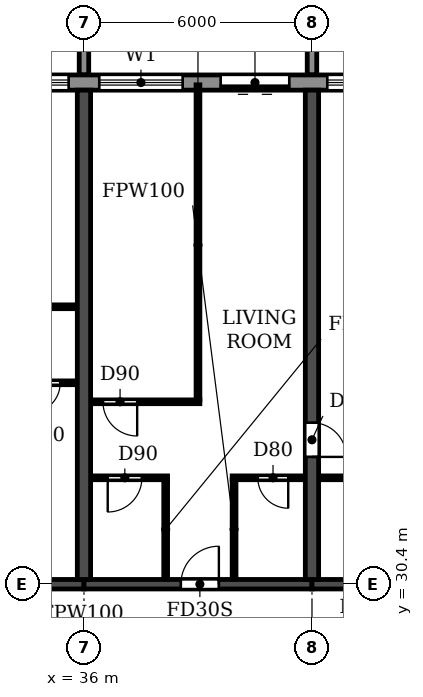
"""IFC4 building model, lengths in metres.
Left out: names, types, materials, properties, quantities, classifications, styles, units other than length and angle.
Written with IfcOpenShell. Run it as: python <this file> out.ifc"""

import sys

from ifc_helpers import new_model, si_unit, direction, frame, frame_2d, origin, place, context, subcontext, project, spatial, polyline, rectangle, outline, extrude, source, transform, mapped, element, fill, save


model = new_model("IFC4")
c1 = context("Model", 3, precision=1e-05, world=origin(), true_north=direction((0.0, 1.0)))
c2 = subcontext(c1, "Body", "Model", "MODEL_VIEW")
j1 = project(units=[si_unit("LENGTHUNIT", "METRE"), si_unit("PLANEANGLEUNIT", "RADIAN")], contexts=[c1])
p1 = place(None, origin())
s1 = spatial("IfcSite", under=j1, at=p1, CompositionType="ELEMENT")
p2 = place(p1, origin())
s2 = spatial("IfcBuilding", under=s1, at=p2, CompositionType="ELEMENT")
p3 = place(p2, frame((0.0, 0.0, 112.5)))
s3 = spatial("IfcBuildingStorey", under=s2, at=p3, CompositionType="ELEMENT", Elevation=112.5)
p4 = place(p3, frame((36.0, 30.525, 0.0), z_axis=(0.0, 0.0, 1.0), x_axis=(0.0, 1.0, 0.0)))
e1 = element("IfcWall", 1, at=p4, inside=s3, PredefinedType="SHEAR", context=c2, shape_type="SweptSolid", body=[
    extrude(rectangle(XDim=12.875, YDim=0.35, at=frame_2d((6.438, 0.0))), origin(), (0.0, 0.0, 1.0), 2.95),
])
p5 = place(p3, frame((42.0, 30.525, 0.0), z_axis=(0.0, 0.0, 1.0), x_axis=(0.0, 1.0, 0.0)))
e2 = element("IfcWall", 2, at=p5, inside=s3, PredefinedType="SHEAR", context=c2, shape_type="SweptSolid", body=[
    extrude(rectangle(XDim=12.875, YDim=0.35, at=frame_2d((6.438, 0.0))), origin(), (0.0, 0.0, 1.0), 2.95),
])
p6 = place(p5, frame((3.225, 0.0, 0.0)))
e3 = element("IfcOpeningElement", 3, at=p6, cuts=e2, PredefinedType="OPENING", context=c2, shape_type="SweptSolid", body=[
    extrude(rectangle(XDim=0.9, YDim=2.1, at=frame_2d((0.45, 1.05))), frame((0.0, 0.185, 0.0), z_axis=(0.0, -1.0, 0.0), x_axis=(1.0, 0.0, 0.0)), (0.0, 0.0, 1.0), 0.37),
])
p7 = place(p3, frame((30.0, 30.4, 0.0), z_axis=(0.0, 0.0, 1.0), x_axis=(1.0, 0.0, 0.0)))
e4 = element("IfcWall", 4, at=p7, inside=s3, PredefinedType="SHEAR", context=c2, shape_type="SweptSolid", body=[
    extrude(rectangle(XDim=6.0, YDim=0.25, at=frame_2d((3.0, 0.0))), origin(), (0.0, 0.0, 1.0), 2.35),
])
p8 = place(p7, frame((2.55, 0.0, 0.0)))
e5 = element("IfcOpeningElement", 5, at=p8, cuts=e4, PredefinedType="OPENING", context=c2, shape_type="SweptSolid", body=[
    extrude(rectangle(XDim=1.0, YDim=2.1, at=frame_2d((0.5, 1.05))), frame((0.0, 0.135, 0.0), z_axis=(0.0, -1.0, 0.0), x_axis=(1.0, 0.0, 0.0)), (0.0, 0.0, 1.0), 0.27),
])
p9 = place(p3, frame((36.0, 30.4, 0.0), z_axis=(0.0, 0.0, 1.0), x_axis=(1.0, 0.0, 0.0)))
e6 = element("IfcWall", 6, at=p9, inside=s3, PredefinedType="SHEAR", context=c2, shape_type="SweptSolid", body=[
    extrude(rectangle(XDim=6.0, YDim=0.25, at=frame_2d((3.0, 0.0))), origin(), (0.0, 0.0, 1.0), 2.35),
])
p10 = place(p9, frame((2.55, 0.0, 0.0)))
e7 = element("IfcOpeningElement", 7, at=p10, cuts=e6, PredefinedType="OPENING", context=c2, shape_type="SweptSolid", body=[
    extrude(rectangle(XDim=1.0, YDim=2.1, at=frame_2d((0.5, 1.05))), frame((0.0, 0.135, 0.0), z_axis=(0.0, -1.0, 0.0), x_axis=(1.0, 0.0, 0.0)), (0.0, 0.0, 1.0), 0.27),
])
p11 = place(p3, frame((42.0, 30.4, 0.0), z_axis=(0.0, 0.0, 1.0), x_axis=(1.0, 0.0, 0.0)))
e8 = element("IfcWall", 8, at=p11, inside=s3, PredefinedType="SHEAR", context=c2, shape_type="SweptSolid", body=[
    extrude(rectangle(XDim=6.0, YDim=0.25, at=frame_2d((3.0, 0.0))), origin(), (0.0, 0.0, 1.0), 2.35),
])
p12 = place(p3, frame((85.317, 43.6, 0.0), z_axis=(0.0, 0.0, 1.0), x_axis=(-1.0, 0.0, 0.0)))
e9 = element("IfcWall", 9, at=p12, inside=s3, PredefinedType="STANDARD", context=c2, shape_type="SweptSolid", body=[
    extrude(rectangle(XDim=68.634, YDim=0.4, at=frame_2d((34.317, 0.0))), origin(), (0.0, 0.0, 1.0), 2.95),
])
p13 = place(p12, frame((64.917, 0.0, 0.0)))
e10 = element("IfcOpeningElement", 10, at=p13, cuts=e9, PredefinedType="OPENING", context=c2, shape_type="SweptSolid", body=[
    extrude(rectangle(XDim=1.8, YDim=2.4, at=frame_2d((0.9, 1.2))), frame((0.0, 0.21, 0.0), z_axis=(0.0, -1.0, 0.0), x_axis=(1.0, 0.0, 0.0)), (0.0, 0.0, 1.0), 0.42),
])
p14 = place(p12, frame((61.717, 0.0, 0.9)))
e11 = element("IfcOpeningElement", 11, at=p14, cuts=e9, PredefinedType="OPENING", context=c2, shape_type="SweptSolid", body=[
    extrude(rectangle(XDim=2.2, YDim=1.5, at=frame_2d((1.1, 0.75))), frame((0.0, 0.21, 0.0), z_axis=(0.0, -1.0, 0.0), x_axis=(1.0, 0.0, 0.0)), (0.0, 0.0, 1.0), 0.42),
])
p15 = place(p12, frame((58.717, 0.0, 0.9)))
e12 = element("IfcOpeningElement", 12, at=p15, cuts=e9, PredefinedType="OPENING", context=c2, shape_type="SweptSolid", body=[
    extrude(rectangle(XDim=2.2, YDim=1.5, at=frame_2d((1.1, 0.75))), frame((0.0, 0.21, 0.0), z_axis=(0.0, -1.0, 0.0), x_axis=(1.0, 0.0, 0.0)), (0.0, 0.0, 1.0), 0.42),
])
p16 = place(p12, frame((55.917, 0.0, 0.0)))
e13 = element("IfcOpeningElement", 13, at=p16, cuts=e9, PredefinedType="OPENING", context=c2, shape_type="SweptSolid", body=[
    extrude(rectangle(XDim=1.8, YDim=2.4, at=frame_2d((0.9, 1.2))), frame((0.0, 0.21, 0.0), z_axis=(0.0, -1.0, 0.0), x_axis=(1.0, 0.0, 0.0)), (0.0, 0.0, 1.0), 0.42),
])
p17 = place(p12, frame((52.917, 0.0, 0.0)))
e14 = element("IfcOpeningElement", 14, at=p17, cuts=e9, PredefinedType="OPENING", context=c2, shape_type="SweptSolid", body=[
    extrude(rectangle(XDim=1.8, YDim=2.4, at=frame_2d((0.9, 1.2))), frame((0.0, 0.21, 0.0), z_axis=(0.0, -1.0, 0.0), x_axis=(1.0, 0.0, 0.0)), (0.0, 0.0, 1.0), 0.42),
])
p18 = place(p12, frame((49.717, 0.0, 0.9)))
e15 = element("IfcOpeningElement", 15, at=p18, cuts=e9, PredefinedType="OPENING", context=c2, shape_type="SweptSolid", body=[
    extrude(rectangle(XDim=2.2, YDim=1.5, at=frame_2d((1.1, 0.75))), frame((0.0, 0.21, 0.0), z_axis=(0.0, -1.0, 0.0), x_axis=(1.0, 0.0, 0.0)), (0.0, 0.0, 1.0), 0.42),
])
p19 = place(p12, frame((46.717, 0.0, 0.9)))
e16 = element("IfcOpeningElement", 16, at=p19, cuts=e9, PredefinedType="OPENING", context=c2, shape_type="SweptSolid", body=[
    extrude(rectangle(XDim=2.2, YDim=1.5, at=frame_2d((1.1, 0.75))), frame((0.0, 0.21, 0.0), z_axis=(0.0, -1.0, 0.0), x_axis=(1.0, 0.0, 0.0)), (0.0, 0.0, 1.0), 0.42),
])
p20 = place(p12, frame((43.917, 0.0, 0.0)))
e17 = element("IfcOpeningElement", 17, at=p20, cuts=e9, PredefinedType="OPENING", context=c2, shape_type="SweptSolid", body=[
    extrude(rectangle(XDim=1.8, YDim=2.4, at=frame_2d((0.9, 1.2))), frame((0.0, 0.21, 0.0), z_axis=(0.0, -1.0, 0.0), x_axis=(1.0, 0.0, 0.0)), (0.0, 0.0, 1.0), 0.42),
])
p21 = place(p12, frame((40.717, 0.0, 0.9)))
e18 = element("IfcOpeningElement", 18, at=p21, cuts=e9, PredefinedType="OPENING", context=c2, shape_type="SweptSolid", body=[
    extrude(rectangle(XDim=2.2, YDim=1.5, at=frame_2d((1.1, 0.75))), frame((0.0, 0.21, 0.0), z_axis=(0.0, -1.0, 0.0), x_axis=(1.0, 0.0, 0.0)), (0.0, 0.0, 1.0), 0.42),
])
p22 = place(p12, frame((37.717, 0.0, 0.9)))
e19 = element("IfcOpeningElement", 19, at=p22, cuts=e9, PredefinedType="OPENING", context=c2, shape_type="SweptSolid", body=[
    extrude(rectangle(XDim=2.2, YDim=1.5, at=frame_2d((1.1, 0.75))), frame((0.0, 0.21, 0.0), z_axis=(0.0, -1.0, 0.0), x_axis=(1.0, 0.0, 0.0)), (0.0, 0.0, 1.0), 0.42),
])
p23 = place(p12, frame((34.917, 0.0, 0.0)))
e20 = element("IfcOpeningElement", 20, at=p23, cuts=e9, PredefinedType="OPENING", context=c2, shape_type="SweptSolid", body=[
    extrude(rectangle(XDim=1.8, YDim=2.4, at=frame_2d((0.9, 1.2))), frame((0.0, 0.21, 0.0), z_axis=(0.0, -1.0, 0.0), x_axis=(1.0, 0.0, 0.0)), (0.0, 0.0, 1.0), 0.42),
])
p24 = place(p12, frame((31.717, 0.0, 0.9)))
e21 = element("IfcOpeningElement", 21, at=p24, cuts=e9, PredefinedType="OPENING", context=c2, shape_type="SweptSolid", body=[
    extrude(rectangle(XDim=2.2, YDim=1.5, at=frame_2d((1.1, 0.75))), frame((0.0, 0.21, 0.0), z_axis=(0.0, -1.0, 0.0), x_axis=(1.0, 0.0, 0.0)), (0.0, 0.0, 1.0), 0.42),
])
p25 = place(p12, frame((28.917, 0.0, 0.0)))
e22 = element("IfcOpeningElement", 22, at=p25, cuts=e9, PredefinedType="OPENING", context=c2, shape_type="SweptSolid", body=[
    extrude(rectangle(XDim=1.8, YDim=2.4, at=frame_2d((0.9, 1.2))), frame((0.0, 0.21, 0.0), z_axis=(0.0, -1.0, 0.0), x_axis=(1.0, 0.0, 0.0)), (0.0, 0.0, 1.0), 0.42),
])
p26 = place(p12, frame((25.717, 0.0, 0.9)))
e23 = element("IfcOpeningElement", 23, at=p26, cuts=e9, PredefinedType="OPENING", context=c2, shape_type="SweptSolid", body=[
    extrude(rectangle(XDim=2.2, YDim=1.5, at=frame_2d((1.1, 0.75))), frame((0.0, 0.21, 0.0), z_axis=(0.0, -1.0, 0.0), x_axis=(1.0, 0.0, 0.0)), (0.0, 0.0, 1.0), 0.42),
])
p27 = place(p12, frame((22.717, 0.0, 0.9)))
e24 = element("IfcOpeningElement", 24, at=p27, cuts=e9, PredefinedType="OPENING", context=c2, shape_type="SweptSolid", body=[
    extrude(rectangle(XDim=2.2, YDim=1.5, at=frame_2d((1.1, 0.75))), frame((0.0, 0.21, 0.0), z_axis=(0.0, -1.0, 0.0), x_axis=(1.0, 0.0, 0.0)), (0.0, 0.0, 1.0), 0.42),
])
p28 = place(p12, frame((19.917, 0.0, 0.0)))
e25 = element("IfcOpeningElement", 25, at=p28, cuts=e9, PredefinedType="OPENING", context=c2, shape_type="SweptSolid", body=[
    extrude(rectangle(XDim=1.8, YDim=2.4, at=frame_2d((0.9, 1.2))), frame((0.0, 0.21, 0.0), z_axis=(0.0, -1.0, 0.0), x_axis=(1.0, 0.0, 0.0)), (0.0, 0.0, 1.0), 0.42),
])
p29 = place(p12, frame((16.717, 0.0, 0.9)))
e26 = element("IfcOpeningElement", 26, at=p29, cuts=e9, PredefinedType="OPENING", context=c2, shape_type="SweptSolid", body=[
    extrude(rectangle(XDim=2.2, YDim=1.5, at=frame_2d((1.1, 0.75))), frame((0.0, 0.21, 0.0), z_axis=(0.0, -1.0, 0.0), x_axis=(1.0, 0.0, 0.0)), (0.0, 0.0, 1.0), 0.42),
])
p30 = place(p12, frame((13.917, 0.0, 0.0)))
e27 = element("IfcOpeningElement", 27, at=p30, cuts=e9, PredefinedType="OPENING", context=c2, shape_type="SweptSolid", body=[
    extrude(rectangle(XDim=1.8, YDim=2.4, at=frame_2d((0.9, 1.2))), frame((0.0, 0.21, 0.0), z_axis=(0.0, -1.0, 0.0), x_axis=(1.0, 0.0, 0.0)), (0.0, 0.0, 1.0), 0.42),
])
p31 = place(p12, frame((10.717, 0.0, 0.9)))
e28 = element("IfcOpeningElement", 28, at=p31, cuts=e9, PredefinedType="OPENING", context=c2, shape_type="SweptSolid", body=[
    extrude(rectangle(XDim=2.2, YDim=1.5, at=frame_2d((1.1, 0.75))), frame((0.0, 0.21, 0.0), z_axis=(0.0, -1.0, 0.0), x_axis=(1.0, 0.0, 0.0)), (0.0, 0.0, 1.0), 0.42),
])
p32 = place(p12, frame((7.717, 0.0, 0.9)))
e29 = element("IfcOpeningElement", 29, at=p32, cuts=e9, PredefinedType="OPENING", context=c2, shape_type="SweptSolid", body=[
    extrude(rectangle(XDim=2.2, YDim=1.5, at=frame_2d((1.1, 0.75))), frame((0.0, 0.21, 0.0), z_axis=(0.0, -1.0, 0.0), x_axis=(1.0, 0.0, 0.0)), (0.0, 0.0, 1.0), 0.42),
])
p33 = place(p12, frame((4.917, 0.0, 0.0)))
e30 = element("IfcOpeningElement", 30, at=p33, cuts=e9, PredefinedType="OPENING", context=c2, shape_type="SweptSolid", body=[
    extrude(rectangle(XDim=1.8, YDim=2.4, at=frame_2d((0.9, 1.2))), frame((0.0, 0.21, 0.0), z_axis=(0.0, -1.0, 0.0), x_axis=(1.0, 0.0, 0.0)), (0.0, 0.0, 1.0), 0.42),
])
p34 = place(p12, frame((1.717, 0.0, 0.9)))
e31 = element("IfcOpeningElement", 31, at=p34, cuts=e9, PredefinedType="OPENING", context=c2, shape_type="SweptSolid", body=[
    extrude(rectangle(XDim=2.2, YDim=1.5, at=frame_2d((1.1, 0.75))), frame((0.0, 0.21, 0.0), z_axis=(0.0, -1.0, 0.0), x_axis=(1.0, 0.0, 0.0)), (0.0, 0.0, 1.0), 0.42),
])
m1 = source(origin(), c2, "Body", "SweptSolid", [
    extrude(outline(polyline([(0.0, 0.0), (0.25, 0.0), (0.25, 3.1), (0.0, 3.1), (0.0, 0.0)])), origin(), (0.0, 0.0, 1.0), 3.1),
])
for number, where in (
    (32, (35.875, 43.8, 0.0)),
    (33, (41.875, 43.8, 0.0)),
):
    element("IfcWall", number, at=place(p3, frame(where)), inside=s3, PredefinedType="STANDARD", context=c2, shape_type="MappedRepresentation", body=[
        mapped(m1, transform((0.0, 0.0, 0.0))),
    ])
p35 = place(p3, frame((36.185, 33.2, 0.0), z_axis=(0.0, 0.0, 1.0), x_axis=(1.0, 0.0, 0.0)))
e34 = element("IfcWall", 34, at=p35, inside=s3, PredefinedType="PARTITIONING", context=c2, shape_type="SweptSolid", body=[
    extrude(rectangle(XDim=2.015, YDim=0.1, at=frame_2d((1.007, 0.0))), origin(), (0.0, 0.0, 1.0), 2.95),
])
p36 = place(p35, frame((0.44, 0.0, 0.0)))
e35 = element("IfcOpeningElement", 35, at=p36, cuts=e34, PredefinedType="OPENING", context=c2, shape_type="SweptSolid", body=[
    extrude(rectangle(XDim=0.9, YDim=2.1, at=frame_2d((0.45, 1.05))), frame((0.0, 0.06, 0.0), z_axis=(0.0, -1.0, 0.0), x_axis=(1.0, 0.0, 0.0)), (0.0, 0.0, 1.0), 0.12),
])
p37 = place(p3, frame((39.9, 33.2, 0.0), z_axis=(0.0, 0.0, 1.0), x_axis=(1.0, 0.0, 0.0)))
e36 = element("IfcWall", 36, at=p37, inside=s3, PredefinedType="PARTITIONING", context=c2, shape_type="SweptSolid", body=[
    extrude(rectangle(XDim=1.915, YDim=0.1, at=frame_2d((0.958, 0.0))), origin(), (0.0, 0.0, 1.0), 2.95),
])
p38 = place(p37, frame((0.675, 0.0, 0.0)))
e37 = element("IfcOpeningElement", 37, at=p38, cuts=e36, PredefinedType="OPENING", context=c2, shape_type="SweptSolid", body=[
    extrude(rectangle(XDim=0.8, YDim=2.1, at=frame_2d((0.4, 1.05))), frame((0.0, 0.06, 0.0), z_axis=(0.0, -1.0, 0.0), x_axis=(1.0, 0.0, 0.0)), (0.0, 0.0, 1.0), 0.12),
])
p39 = place(p3, frame((42.185, 33.2, 0.0), z_axis=(0.0, 0.0, 1.0), x_axis=(1.0, 0.0, 0.0)))
e38 = element("IfcWall", 38, at=p39, inside=s3, PredefinedType="PARTITIONING", context=c2, shape_type="SweptSolid", body=[
    extrude(rectangle(XDim=2.715, YDim=0.1, at=frame_2d((1.357, 0.0))), origin(), (0.0, 0.0, 1.0), 2.95),
])
p40 = place(p39, frame((0.915, 0.0, 0.0)))
e39 = element("IfcOpeningElement", 39, at=p40, cuts=e38, PredefinedType="OPENING", context=c2, shape_type="SweptSolid", body=[
    extrude(rectangle(XDim=0.8, YDim=2.1, at=frame_2d((0.4, 1.05))), frame((0.0, 0.06, 0.0), z_axis=(0.0, -1.0, 0.0), x_axis=(1.0, 0.0, 0.0)), (0.0, 0.0, 1.0), 0.12),
])
p41 = place(p3, frame((36.185, 35.2, 0.0), z_axis=(0.0, 0.0, 1.0), x_axis=(1.0, 0.0, 0.0)))
e40 = element("IfcWall", 40, at=p41, inside=s3, PredefinedType="PARTITIONING", context=c2, shape_type="SweptSolid", body=[
    extrude(rectangle(XDim=2.865, YDim=0.1, at=frame_2d((1.433, 0.0))), origin(), (0.0, 0.0, 1.0), 2.95),
])
p42 = place(p41, frame((0.315, 0.0, 0.0)))
e41 = element("IfcOpeningElement", 41, at=p42, cuts=e40, PredefinedType="OPENING", context=c2, shape_type="SweptSolid", body=[
    extrude(rectangle(XDim=0.9, YDim=2.1, at=frame_2d((0.45, 1.05))), frame((0.0, 0.06, 0.0), z_axis=(0.0, -1.0, 0.0), x_axis=(1.0, 0.0, 0.0)), (0.0, 0.0, 1.0), 0.12),
])
p43 = place(p3, frame((33.9, 35.7, 0.0), z_axis=(0.0, 0.0, 1.0), x_axis=(1.0, 0.0, 0.0)))
e42 = element("IfcWall", 42, at=p43, inside=s3, PredefinedType="PARTITIONING", context=c2, shape_type="SweptSolid", body=[
    extrude(rectangle(XDim=1.915, YDim=0.1, at=frame_2d((0.958, 0.0))), origin(), (0.0, 0.0, 1.0), 2.95),
])
p44 = place(p43, frame((0.675, 0.0, 0.0)))
e43 = element("IfcOpeningElement", 43, at=p44, cuts=e42, PredefinedType="OPENING", context=c2, shape_type="SweptSolid", body=[
    extrude(rectangle(XDim=0.8, YDim=2.1, at=frame_2d((0.4, 1.05))), frame((0.0, 0.06, 0.0), z_axis=(0.0, -1.0, 0.0), x_axis=(1.0, 0.0, 0.0)), (0.0, 0.0, 1.0), 0.12),
])
p45 = place(p3, frame((32.95, 37.7, 0.0), z_axis=(0.0, 0.0, 1.0), x_axis=(1.0, 0.0, 0.0)))
e44 = element("IfcWall", 44, at=p45, inside=s3, PredefinedType="PARTITIONING", context=c2, shape_type="SweptSolid", body=[
    extrude(rectangle(XDim=2.865, YDim=0.1, at=frame_2d((1.433, 0.0))), origin(), (0.0, 0.0, 1.0), 2.95),
])
p46 = place(p45, frame((0.55, 0.0, 0.0)))
e45 = element("IfcOpeningElement", 45, at=p46, cuts=e44, PredefinedType="OPENING", context=c2, shape_type="SweptSolid", body=[
    extrude(rectangle(XDim=0.9, YDim=2.1, at=frame_2d((0.45, 1.05))), frame((0.0, 0.06, 0.0), z_axis=(0.0, -1.0, 0.0), x_axis=(1.0, 0.0, 0.0)), (0.0, 0.0, 1.0), 0.12),
])
p47 = place(p3, frame((38.15, 30.535, 0.0), z_axis=(0.0, 0.0, 1.0), x_axis=(0.0, 1.0, 0.0)))
e46 = element("IfcWall", 46, at=p47, inside=s3, PredefinedType="PARTITIONING", context=c2, shape_type="SweptSolid", body=[
    extrude(rectangle(XDim=2.615, YDim=0.1, at=frame_2d((1.308, 0.0))), origin(), (0.0, 0.0, 1.0), 2.95),
])
p48 = place(p3, frame((39.0, 35.25, 0.0), z_axis=(0.0, 0.0, 1.0), x_axis=(0.0, 1.0, 0.0)))
e47 = element("IfcWall", 47, at=p48, inside=s3, PredefinedType="PARTITIONING", context=c2, shape_type="SweptSolid", body=[
    extrude(rectangle(XDim=8.29, YDim=0.1, at=frame_2d((4.145, 0.0))), origin(), (0.0, 0.0, 1.0), 2.95),
])
p49 = place(p3, frame((39.95, 30.535, 0.0), z_axis=(0.0, 0.0, 1.0), x_axis=(0.0, 1.0, 0.0)))
e48 = element("IfcWall", 48, at=p49, inside=s3, PredefinedType="PARTITIONING", context=c2, shape_type="SweptSolid", body=[
    extrude(rectangle(XDim=2.615, YDim=0.1, at=frame_2d((1.308, 0.0))), origin(), (0.0, 0.0, 1.0), 2.95),
])
p50 = place(p18, origin())
e49 = element("IfcWindow", 49, at=p50, inside=s3, PartitioningType="DOUBLE_PANEL_HORIZONTAL", PredefinedType="WINDOW", context=c2, shape_type="SweptSolid", body=[
    extrude(rectangle(XDim=2.2, YDim=1.5, at=frame_2d((1.1, 0.75))), frame((0.0, 0.03, 0.0), z_axis=(0.0, -1.0, 0.0), x_axis=(1.0, 0.0, 0.0)), (0.0, 0.0, 1.0), 0.06),
])
fill(e15, e49)
p51 = place(p19, origin())
e50 = element("IfcWindow", 50, at=p51, inside=s3, PartitioningType="DOUBLE_PANEL_HORIZONTAL", PredefinedType="WINDOW", context=c2, shape_type="SweptSolid", body=[
    extrude(rectangle(XDim=2.2, YDim=1.5, at=frame_2d((1.1, 0.75))), frame((0.0, 0.03, 0.0), z_axis=(0.0, -1.0, 0.0), x_axis=(1.0, 0.0, 0.0)), (0.0, 0.0, 1.0), 0.06),
])
fill(e16, e50)
p52 = place(p20, origin())
e51 = element("IfcDoor", 51, at=p52, inside=s3, OperationType="DOUBLE_DOOR_SLIDING", PredefinedType="DOOR", context=c2, shape_type="SweptSolid", body=[
    extrude(rectangle(XDim=1.8, YDim=2.4, at=frame_2d((0.9, 1.2))), frame((0.0, 0.025, 0.0), z_axis=(0.0, -1.0, 0.0), x_axis=(1.0, 0.0, 0.0)), (0.0, 0.0, 1.0), 0.05),
])
fill(e17, e51)
p53 = place(p21, origin())
e52 = element("IfcWindow", 52, at=p53, inside=s3, PartitioningType="DOUBLE_PANEL_HORIZONTAL", PredefinedType="WINDOW", context=c2, shape_type="SweptSolid", body=[
    extrude(rectangle(XDim=2.2, YDim=1.5, at=frame_2d((1.1, 0.75))), frame((0.0, 0.03, 0.0), z_axis=(0.0, -1.0, 0.0), x_axis=(1.0, 0.0, 0.0)), (0.0, 0.0, 1.0), 0.06),
])
fill(e18, e52)
p54 = place(p44, frame((0.8, 0.0, 0.0), z_axis=(0.0, 0.0, 1.0), x_axis=(-1.0, 0.0, 0.0)))
e53 = element("IfcDoor", 53, at=p54, inside=s3, OperationType="SINGLE_SWING_RIGHT", PredefinedType="DOOR", context=c2, shape_type="SweptSolid", body=[
    extrude(rectangle(XDim=0.8, YDim=2.1, at=frame_2d((0.4, 1.05))), frame((0.0, 0.025, 0.0), z_axis=(0.0, -1.0, 0.0), x_axis=(1.0, 0.0, 0.0)), (0.0, 0.0, 1.0), 0.05),
])
fill(e43, e53)
p55 = place(p42, frame((0.9, 0.0, 0.0), z_axis=(0.0, 0.0, 1.0), x_axis=(-1.0, 0.0, 0.0)))
e54 = element("IfcDoor", 54, at=p55, inside=s3, OperationType="SINGLE_SWING_LEFT", PredefinedType="DOOR", context=c2, shape_type="SweptSolid", body=[
    extrude(rectangle(XDim=0.9, YDim=2.1, at=frame_2d((0.45, 1.05))), frame((0.0, 0.025, 0.0), z_axis=(0.0, -1.0, 0.0), x_axis=(1.0, 0.0, 0.0)), (0.0, 0.0, 1.0), 0.05),
])
fill(e41, e54)
p56 = place(p36, frame((0.9, 0.0, 0.0), z_axis=(0.0, 0.0, 1.0), x_axis=(-1.0, 0.0, 0.0)))
e55 = element("IfcDoor", 55, at=p56, inside=s3, OperationType="SINGLE_SWING_RIGHT", PredefinedType="DOOR", context=c2, shape_type="SweptSolid", body=[
    extrude(rectangle(XDim=0.9, YDim=2.1, at=frame_2d((0.45, 1.05))), frame((0.0, 0.025, 0.0), z_axis=(0.0, -1.0, 0.0), x_axis=(1.0, 0.0, 0.0)), (0.0, 0.0, 1.0), 0.05),
])
fill(e35, e55)
p57 = place(p10, origin())
e56 = element("IfcDoor", 56, at=p57, inside=s3, OperationType="SINGLE_SWING_RIGHT", PredefinedType="DOOR", context=c2, shape_type="SweptSolid", body=[
    extrude(rectangle(XDim=1.0, YDim=2.1, at=frame_2d((0.5, 1.05))), frame((0.0, 0.025, 0.0), z_axis=(0.0, -1.0, 0.0), x_axis=(1.0, 0.0, 0.0)), (0.0, 0.0, 1.0), 0.05),
])
fill(e7, e56)
p58 = place(p38, frame((0.8, 0.0, 0.0), z_axis=(0.0, 0.0, 1.0), x_axis=(-1.0, 0.0, 0.0)))
e57 = element("IfcDoor", 57, at=p58, inside=s3, OperationType="SINGLE_SWING_LEFT", PredefinedType="DOOR", context=c2, shape_type="SweptSolid", body=[
    extrude(rectangle(XDim=0.8, YDim=2.1, at=frame_2d((0.4, 1.05))), frame((0.0, 0.025, 0.0), z_axis=(0.0, -1.0, 0.0), x_axis=(1.0, 0.0, 0.0)), (0.0, 0.0, 1.0), 0.05),
])
fill(e37, e57)
p59 = place(p6, frame((0.9, 0.0, 0.0), z_axis=(0.0, 0.0, 1.0), x_axis=(-1.0, 0.0, 0.0)))
e58 = element("IfcDoor", 58, at=p59, inside=s3, OperationType="SINGLE_SWING_RIGHT", PredefinedType="DOOR", context=c2, shape_type="SweptSolid", body=[
    extrude(rectangle(XDim=0.9, YDim=2.1, at=frame_2d((0.45, 1.05))), frame((0.0, 0.025, 0.0), z_axis=(0.0, -1.0, 0.0), x_axis=(1.0, 0.0, 0.0)), (0.0, 0.0, 1.0), 0.05),
])
fill(e3, e58)
save(model, sys.argv[1])
